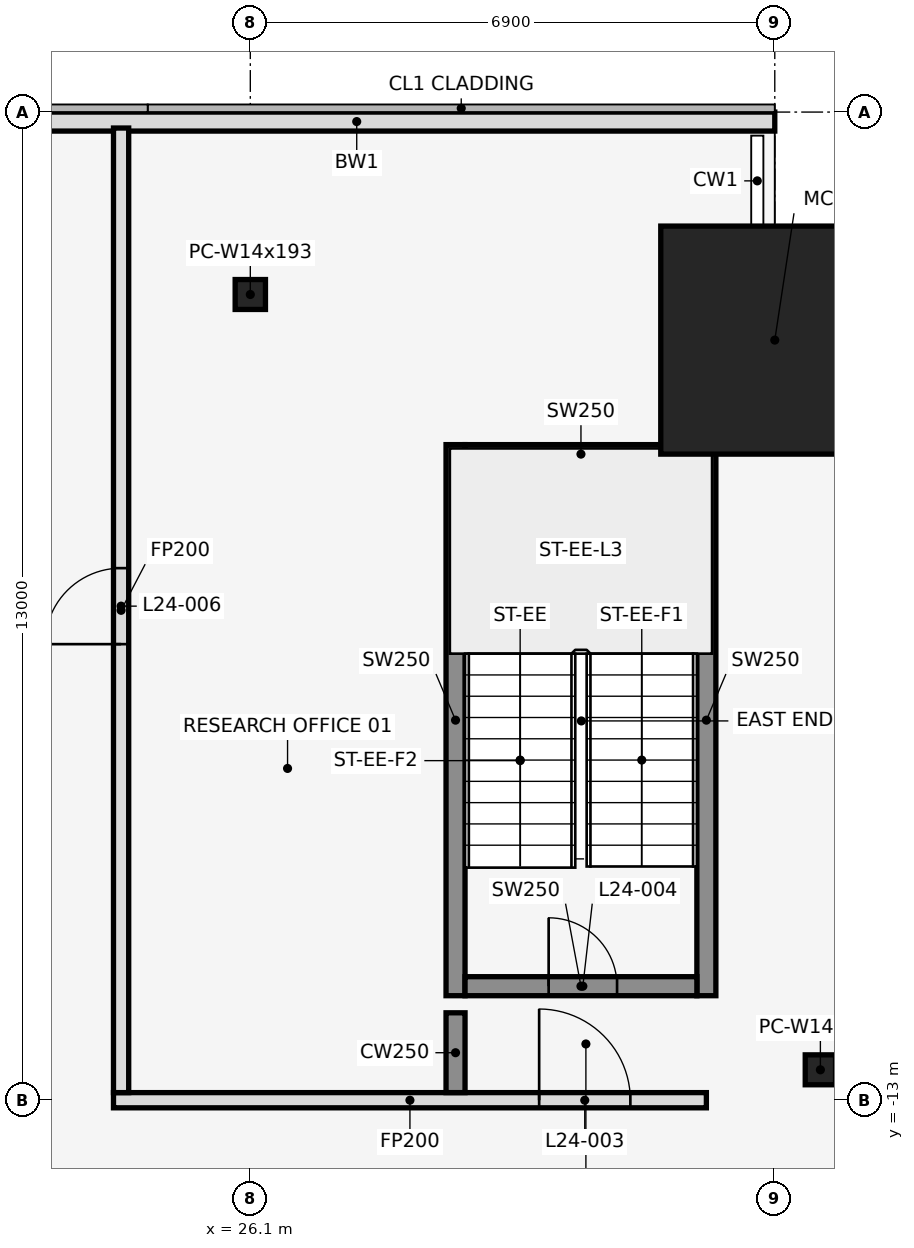
"""IFC4 building model, lengths in metres.
Left out: names, types, materials, properties, quantities, classifications, styles, units other than length and angle.
Written with IfcOpenShell. Run it as: python <this file> out.ifc"""

import sys

from ifc_helpers import new_model, si_unit, direction, frame, frame_2d, origin, origin_2d, place, context, subcontext, project, spatial, rectangle, hollow_rectangle, i_section, extrude, element, fill, save


model = new_model("IFC4")
c1 = context("Model", 3, precision=1e-05, world=origin(), true_north=direction((0.0, 1.0)))
c2 = subcontext(c1, "Body", "Model", "MODEL_VIEW")
j1 = project(units=[si_unit("LENGTHUNIT", "METRE"), si_unit("PLANEANGLEUNIT", "RADIAN")], contexts=[c1])
p1 = place(None, origin())
s1 = spatial("IfcSite", under=j1, at=p1, CompositionType="ELEMENT")
p2 = place(p1, origin())
s2 = spatial("IfcBuilding", under=s1, at=p2, CompositionType="ELEMENT")
p3 = place(p2, frame((0.0, 0.0, 114.5)))
s3 = spatial("IfcBuildingStorey", under=s2, at=p3, CompositionType="ELEMENT", Elevation=114.5)
p4 = place(p3, frame((26.1, -2.4, 0.0), z_axis=(0.0, 0.0, 1.0), x_axis=(1.0, 0.0, 0.0)))
e1 = element("IfcColumn", 1, at=p4, inside=s3, PredefinedType="COLUMN", context=c2, shape_type="SweptSolid", body=[
    extrude(i_section(OverallWidth=0.399, OverallDepth=0.394, WebThickness=0.023, FlangeThickness=0.037, at=origin_2d()), origin(), (0.0, 0.0, 1.0), 4.1),
])
p5 = place(p3, frame((33.0, -3.0, 0.0), z_axis=(0.0, 0.0, 1.0), x_axis=(1.0, 0.0, 0.0)))
e2 = element("IfcColumn", 2, at=p5, inside=s3, PredefinedType="COLUMN", context=c2, shape_type="SweptSolid", body=[
    extrude(hollow_rectangle(XDim=3.0, YDim=3.0, WallThickness=0.09, at=origin_2d()), origin(), (0.0, 0.0, 1.0), 4.1),
])
p6 = place(p3, frame((33.6, -12.6, 0.0), z_axis=(0.0, 0.0, 1.0), x_axis=(1.0, 0.0, 0.0)))
e3 = element("IfcColumn", 3, at=p6, inside=s3, PredefinedType="COLUMN", context=c2, shape_type="SweptSolid", body=[
    extrude(i_section(OverallWidth=0.399, OverallDepth=0.394, WebThickness=0.023, FlangeThickness=0.037, at=origin_2d()), origin(), (0.0, 0.0, 1.0), 4.1),
])
p7 = place(p3, frame((33.0, -0.125, 0.0), z_axis=(0.0, 0.0, 1.0), x_axis=(-1.0, 0.0, 0.0)))
e4 = element("IfcWall", 4, at=p7, inside=s3, PredefinedType="STANDARD", context=c2, shape_type="SweptSolid", body=[
    extrude(rectangle(XDim=11.0, YDim=0.25, at=frame_2d((5.5, 0.0))), origin(), (0.0, 0.0, 1.0), 3.95),
])
for number, where, z_axis, x_axis in (
    (5, (28.8, -11.625, 0.0), (0.0, 0.0, 1.0), (0.0, 1.0, 0.0)),
    (6, (32.1, -11.625, 0.0), (0.0, 0.0, 1.0), (0.0, 1.0, 0.0)),
):
    element("IfcWall", number, at=place(p3, frame(where, z_axis=z_axis, x_axis=x_axis)), inside=s3, PredefinedType="SHEAR", context=c2, shape_type="SweptSolid", body=[
        extrude(rectangle(XDim=7.25, YDim=0.25, at=frame_2d((3.625, 0.0))), origin(), (0.0, 0.0, 1.0), 4.1),
    ])
p8 = place(p3, frame((28.925, -11.5, 0.0), z_axis=(0.0, 0.0, 1.0), x_axis=(1.0, 0.0, 0.0)))
e7 = element("IfcWall", 7, at=p8, inside=s3, PredefinedType="SHEAR", context=c2, shape_type="SweptSolid", body=[
    extrude(rectangle(XDim=3.05, YDim=0.25, at=frame_2d((1.525, 0.0))), origin(), (0.0, 0.0, 1.0), 4.1),
])
p9 = place(p8, frame((1.1, 0.0, 0.0)))
e8 = element("IfcOpeningElement", 8, at=p9, cuts=e7, PredefinedType="OPENING", context=c2, shape_type="SweptSolid", body=[
    extrude(rectangle(XDim=0.9, YDim=2.1, at=frame_2d((0.45, 1.05))), frame((0.0, 0.137, 0.0), z_axis=(0.0, -1.0, 0.0), x_axis=(1.0, 0.0, 0.0)), (0.0, 0.0, 1.0), 0.274),
])
p10 = place(p3, frame((28.925, -4.5, 0.0), z_axis=(0.0, 0.0, 1.0), x_axis=(1.0, 0.0, 0.0)))
e9 = element("IfcWall", 9, at=p10, inside=s3, PredefinedType="SHEAR", context=c2, shape_type="SweptSolid", body=[
    extrude(rectangle(XDim=3.05, YDim=0.25, at=frame_2d((1.525, 0.0))), origin(), (0.0, 0.0, 1.0), 4.1),
])
p11 = place(p3, frame((24.3, -13.0, 0.0), z_axis=(0.0, 0.0, 1.0), x_axis=(1.0, 0.0, 0.0)))
e10 = element("IfcWall", 10, at=p11, inside=s3, PredefinedType="PARTITIONING", context=c2, shape_type="SweptSolid", body=[
    extrude(rectangle(XDim=7.8, YDim=0.2, at=frame_2d((3.9, 0.0))), origin(), (0.0, 0.0, 1.0), 3.018),
])
p12 = place(p11, frame((5.6, 0.0, 0.0)))
e11 = element("IfcOpeningElement", 11, at=p12, cuts=e10, PredefinedType="OPENING", context=c2, shape_type="SweptSolid", body=[
    extrude(rectangle(XDim=1.2, YDim=2.1, at=frame_2d((0.6, 1.05))), frame((0.0, 0.112, 0.0), z_axis=(0.0, -1.0, 0.0), x_axis=(1.0, 0.0, 0.0)), (0.0, 0.0, 1.0), 0.224),
])
p13 = place(p3, frame((24.4, -12.9, 0.0), z_axis=(0.0, 0.0, 1.0), x_axis=(0.0, 1.0, 0.0)))
e12 = element("IfcWall", 12, at=p13, inside=s3, PredefinedType="PARTITIONING", context=c2, shape_type="SweptSolid", body=[
    extrude(rectangle(XDim=12.69, YDim=0.2, at=frame_2d((6.345, 0.0))), origin(), (0.0, 0.0, 1.0), 3.018),
])
p14 = place(p13, frame((5.9, 0.0, 0.0)))
e13 = element("IfcOpeningElement", 13, at=p14, cuts=e12, PredefinedType="OPENING", context=c2, shape_type="SweptSolid", body=[
    extrude(rectangle(XDim=1.0, YDim=2.1, at=frame_2d((0.5, 1.05))), frame((0.0, 0.112, 0.0), z_axis=(0.0, -1.0, 0.0), x_axis=(1.0, 0.0, 0.0)), (0.0, 0.0, 1.0), 0.224),
])
p15 = place(p3, frame((28.8, -12.9, 0.0), z_axis=(0.0, 0.0, 1.0), x_axis=(0.0, 1.0, 0.0)))
e14 = element("IfcWall", 14, at=p15, inside=s3, PredefinedType="SHEAR", context=c2, shape_type="SweptSolid", body=[
    extrude(rectangle(XDim=1.05, YDim=0.25, at=frame_2d((0.525, 0.0))), origin(), (0.0, 0.0, 1.0), 4.1),
])
p16 = place(p12, origin())
e15 = element("IfcDoor", 15, at=p16, inside=s3, OperationType="SINGLE_SWING_RIGHT", PredefinedType="DOOR", context=c2, shape_type="SweptSolid", body=[
    extrude(rectangle(XDim=1.2, YDim=2.1, at=frame_2d((0.6, 1.05))), frame((0.0, 0.025, 0.0), z_axis=(0.0, -1.0, 0.0), x_axis=(1.0, 0.0, 0.0)), (0.0, 0.0, 1.0), 0.05),
])
fill(e11, e15)
p17 = place(p9, origin())
e16 = element("IfcDoor", 16, at=p17, inside=s3, OperationType="SINGLE_SWING_LEFT", PredefinedType="DOOR", context=c2, shape_type="SweptSolid", body=[
    extrude(rectangle(XDim=0.9, YDim=2.1, at=frame_2d((0.45, 1.05))), frame((0.0, 0.025, 0.0), z_axis=(0.0, -1.0, 0.0), x_axis=(1.0, 0.0, 0.0)), (0.0, 0.0, 1.0), 0.05),
])
fill(e8, e16)
p18 = place(p14, frame((1.0, 0.0, 0.0), z_axis=(0.0, 0.0, 1.0), x_axis=(-1.0, 0.0, 0.0)))
e17 = element("IfcDoor", 17, at=p18, inside=s3, OperationType="SINGLE_SWING_RIGHT", PredefinedType="DOOR", context=c2, shape_type="SweptSolid", body=[
    extrude(rectangle(XDim=1.0, YDim=2.1, at=frame_2d((0.5, 1.05))), frame((0.0, 0.025, 0.0), z_axis=(0.0, -1.0, 0.0), x_axis=(1.0, 0.0, 0.0)), (0.0, 0.0, 1.0), 0.05),
])
fill(e13, e17)
save(model, sys.argv[1])
